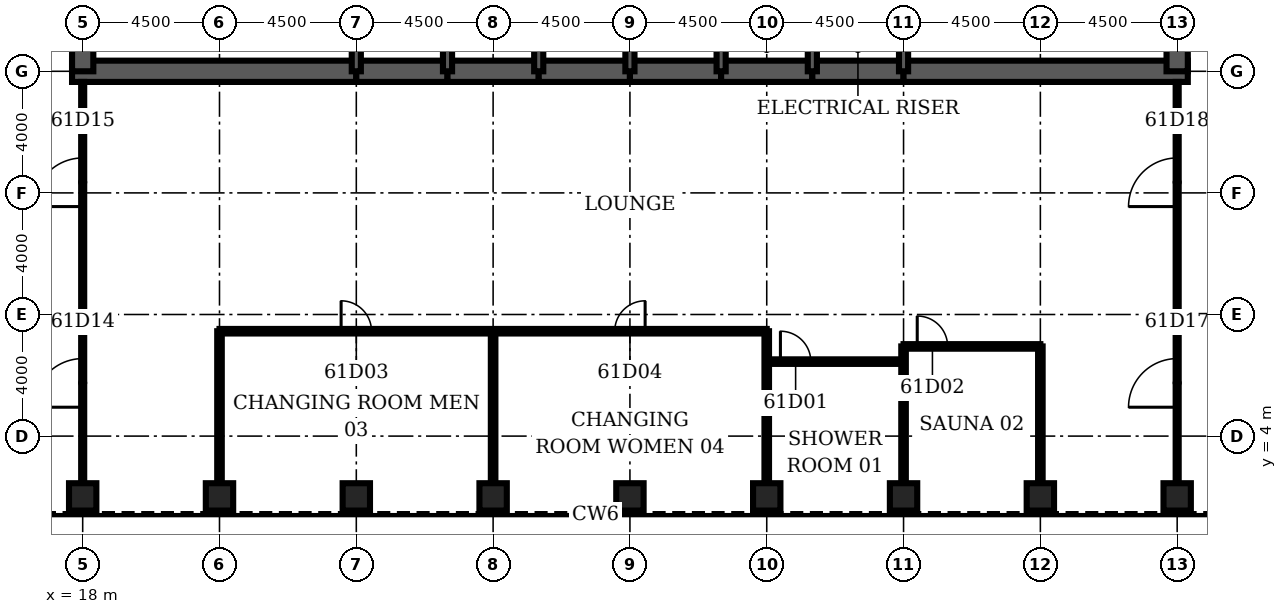
"""IFC4 building model, lengths in metres.
Left out: names, types, materials, properties, quantities, classifications, styles, units other than length and angle.
Written with IfcOpenShell. Run it as: python <this file> out.ifc"""

import sys

from ifc_helpers import new_model, si_unit, direction, frame, frame_2d, origin, origin_2d, place, context, subcontext, project, spatial, rectangle, hollow_rectangle, extrude, element, fill, save


model = new_model("IFC4")
c1 = context("Model", 3, precision=1e-05, world=origin(), true_north=direction((0.0, 1.0)))
c2 = subcontext(c1, "Body", "Model", "MODEL_VIEW")
j1 = project(units=[si_unit("LENGTHUNIT", "METRE"), si_unit("PLANEANGLEUNIT", "RADIAN")], contexts=[c1])
p1 = place(None, origin())
s1 = spatial("IfcSite", under=j1, at=p1, CompositionType="ELEMENT")
p2 = place(p1, origin())
s2 = spatial("IfcBuilding", under=s1, at=p2, CompositionType="ELEMENT")
p3 = place(p2, frame((0.0, 0.0, 271.1)))
s3 = spatial("IfcBuildingStorey", under=s2, at=p3, CompositionType="ELEMENT", Elevation=271.1)
for number, where, z_axis, x_axis in (
    (1, (18.0, 2.0, 0.0), (0.0, 0.0, 1.0), (0.0, 1.0, 0.0)),
    (2, (22.5, 2.0, 0.0), (0.0, 0.0, 1.0), (0.0, 1.0, 0.0)),
    (3, (27.0, 2.0, 0.0), (0.0, 0.0, 1.0), (0.0, 1.0, 0.0)),
    (4, (31.5, 2.0, 0.0), (0.0, 0.0, 1.0), (0.0, 1.0, 0.0)),
    (5, (36.0, 2.0, 0.0), (0.0, 0.0, 1.0), (0.0, 1.0, 0.0)),
    (6, (40.5, 2.0, 0.0), (0.0, 0.0, 1.0), (0.0, 1.0, 0.0)),
    (7, (45.0, 2.0, 0.0), (0.0, 0.0, 1.0), (0.0, 1.0, 0.0)),
    (8, (49.5, 2.0, 0.0), (0.0, 0.0, 1.0), (0.0, 1.0, 0.0)),
    (9, (54.0, 2.0, 0.0), (0.0, 0.0, 1.0), (0.0, 1.0, 0.0)),
):
    element("IfcColumn", number, at=place(p3, frame(where, z_axis=z_axis, x_axis=x_axis)), inside=s3, PredefinedType="COLUMN", context=c2, shape_type="SweptSolid", body=[
        extrude(hollow_rectangle(XDim=0.9, YDim=0.9, WallThickness=0.07, at=origin_2d()), origin(), (0.0, 0.0, 1.0), 4.2),
    ])
p4 = place(p3, frame((17.65, 16.0, 0.0), z_axis=(0.0, 0.0, 1.0), x_axis=(1.0, 0.0, 0.0)))
e10 = element("IfcWall", 10, at=p4, inside=s3, PredefinedType="SHEAR", context=c2, shape_type="SweptSolid", body=[
    extrude(rectangle(XDim=9.35, YDim=0.7, at=frame_2d((4.675, 0.0))), origin(), (0.0, 0.0, 1.0), 4.2),
])
for number, where, z_axis, x_axis in (
    (11, (27.0, 16.0, 0.0), (0.0, 0.0, 1.0), (1.0, 0.0, 0.0)),
    (12, (30.0, 16.0, 0.0), (0.0, 0.0, 1.0), (1.0, 0.0, 0.0)),
    (13, (33.0, 16.0, 0.0), (0.0, 0.0, 1.0), (1.0, 0.0, 0.0)),
    (14, (36.0, 16.0, 0.0), (0.0, 0.0, 1.0), (1.0, 0.0, 0.0)),
    (15, (39.0, 16.0, 0.0), (0.0, 0.0, 1.0), (1.0, 0.0, 0.0)),
    (16, (42.0, 16.0, 0.0), (0.0, 0.0, 1.0), (1.0, 0.0, 0.0)),
):
    element("IfcWall", number, at=place(p3, frame(where, z_axis=z_axis, x_axis=x_axis)), inside=s3, PredefinedType="SHEAR", context=c2, shape_type="SweptSolid", body=[
        extrude(rectangle(XDim=3.0, YDim=0.7, at=frame_2d((1.5, 0.0))), origin(), (0.0, 0.0, 1.0), 4.2),
    ])
p5 = place(p3, frame((45.0, 16.0, 0.0), z_axis=(0.0, 0.0, 1.0), x_axis=(1.0, 0.0, 0.0)))
e17 = element("IfcWall", 17, at=p5, inside=s3, PredefinedType="SHEAR", context=c2, shape_type="SweptSolid", body=[
    extrude(rectangle(XDim=9.35, YDim=0.7, at=frame_2d((4.675, 0.0))), origin(), (0.0, 0.0, 1.0), 4.2),
])
for number, where, z_axis, x_axis in (
    (18, (18.0, 19.2, 0.0), (0.0, 0.0, 1.0), (0.0, -1.0, 0.0)),
    (19, (54.0, 16.0, 0.0), (0.0, 0.0, 1.0), (0.0, 1.0, 0.0)),
):
    element("IfcWall", number, at=place(p3, frame(where, z_axis=z_axis, x_axis=x_axis)), inside=s3, PredefinedType="SHEAR", context=c2, shape_type="SweptSolid", body=[
        extrude(rectangle(XDim=3.2, YDim=0.7, at=frame_2d((1.6, 0.0))), origin(), (0.0, 0.0, 1.0), 4.2),
    ])
for number, where, z_axis, x_axis in (
    (20, (27.0, 16.0, 0.0), (0.0, 0.0, 1.0), (0.0, 1.0, 0.0)),
    (21, (30.0, 16.0, 0.0), (0.0, 0.0, 1.0), (0.0, 1.0, 0.0)),
    (22, (33.0, 16.0, 0.0), (0.0, 0.0, 1.0), (0.0, 1.0, 0.0)),
    (23, (36.0, 16.0, 0.0), (0.0, 0.0, 1.0), (0.0, 1.0, 0.0)),
    (24, (39.0, 16.0, 0.0), (0.0, 0.0, 1.0), (0.0, 1.0, 0.0)),
    (25, (42.0, 16.0, 0.0), (0.0, 0.0, 1.0), (0.0, 1.0, 0.0)),
    (26, (45.0, 16.0, 0.0), (0.0, 0.0, 1.0), (0.0, 1.0, 0.0)),
):
    element("IfcWall", number, at=place(p3, frame(where, z_axis=z_axis, x_axis=x_axis)), inside=s3, PredefinedType="SOLIDWALL", context=c2, shape_type="SweptSolid", body=[
        extrude(rectangle(XDim=3.2, YDim=0.3, at=frame_2d((1.6, 0.0))), origin(), (0.0, 0.0, 1.0), 4.2),
    ])
p6 = place(p3, frame((40.5, 6.45, 0.0), z_axis=(0.0, 0.0, 1.0), x_axis=(1.0, 0.0, 0.0)))
e27 = element("IfcWall", 27, at=p6, inside=s3, PredefinedType="PARTITIONING", context=c2, shape_type="SweptSolid", body=[
    extrude(rectangle(XDim=4.5, YDim=0.15, at=frame_2d((2.25, 0.0))), origin(), (0.0, 0.0, 1.0), 3.0),
])
p7 = place(p6, frame((0.45, 0.0, 0.0)))
e28 = element("IfcOpeningElement", 28, at=p7, cuts=e27, PredefinedType="OPENING", context=c2, shape_type="SweptSolid", body=[
    extrude(rectangle(XDim=1.0, YDim=2.1, at=frame_2d((0.5, 1.05))), frame((0.0, 0.085, 0.0), z_axis=(0.0, -1.0, 0.0), x_axis=(1.0, 0.0, 0.0)), (0.0, 0.0, 1.0), 0.17),
])
p8 = place(p3, frame((45.0, 6.95, 0.0), z_axis=(0.0, 0.0, 1.0), x_axis=(1.0, 0.0, 0.0)))
e29 = element("IfcWall", 29, at=p8, inside=s3, PredefinedType="PARTITIONING", context=c2, shape_type="SweptSolid", body=[
    extrude(rectangle(XDim=4.5, YDim=0.15, at=frame_2d((2.25, 0.0))), origin(), (0.0, 0.0, 1.0), 3.0),
])
p9 = place(p8, frame((0.45, 0.0, 0.0)))
e30 = element("IfcOpeningElement", 30, at=p9, cuts=e29, PredefinedType="OPENING", context=c2, shape_type="SweptSolid", body=[
    extrude(rectangle(XDim=1.0, YDim=2.1, at=frame_2d((0.5, 1.05))), frame((0.0, 0.085, 0.0), z_axis=(0.0, -1.0, 0.0), x_axis=(1.0, 0.0, 0.0)), (0.0, 0.0, 1.0), 0.17),
])
p10 = place(p3, frame((22.5, 7.45, 0.0), z_axis=(0.0, 0.0, 1.0), x_axis=(1.0, 0.0, 0.0)))
e31 = element("IfcWall", 31, at=p10, inside=s3, PredefinedType="PARTITIONING", context=c2, shape_type="SweptSolid", body=[
    extrude(rectangle(XDim=18.0, YDim=0.15, at=frame_2d((9.0, 0.0))), origin(), (0.0, 0.0, 1.0), 3.0),
])
p11 = place(p10, frame((4.0, 0.0, 0.0)))
e32 = element("IfcOpeningElement", 32, at=p11, cuts=e31, PredefinedType="OPENING", context=c2, shape_type="SweptSolid", body=[
    extrude(rectangle(XDim=1.0, YDim=2.1, at=frame_2d((0.5, 1.05))), frame((0.0, 0.085, 0.0), z_axis=(0.0, -1.0, 0.0), x_axis=(1.0, 0.0, 0.0)), (0.0, 0.0, 1.0), 0.17),
])
p12 = place(p10, frame((13.0, 0.0, 0.0)))
e33 = element("IfcOpeningElement", 33, at=p12, cuts=e31, PredefinedType="OPENING", context=c2, shape_type="SweptSolid", body=[
    extrude(rectangle(XDim=1.0, YDim=2.1, at=frame_2d((0.5, 1.05))), frame((0.0, 0.085, 0.0), z_axis=(0.0, -1.0, 0.0), x_axis=(1.0, 0.0, 0.0)), (0.0, 0.0, 1.0), 0.17),
])
p13 = place(p3, frame((18.0, 2.45, 0.0), z_axis=(0.0, 0.0, 1.0), x_axis=(0.0, 1.0, 0.0)))
e34 = element("IfcWall", 34, at=p13, inside=s3, PredefinedType="PARTITIONING", context=c2, shape_type="SweptSolid", body=[
    extrude(rectangle(XDim=13.2, YDim=0.1, at=frame_2d((6.6, 0.0))), origin(), (0.0, 0.0, 1.0), 3.0),
])
p14 = place(p13, frame((2.5, 0.0, 0.0)))
e35 = element("IfcOpeningElement", 35, at=p14, cuts=e34, PredefinedType="OPENING", context=c2, shape_type="SweptSolid", body=[
    extrude(rectangle(XDim=1.6, YDim=2.1, at=frame_2d((0.8, 1.05))), frame((0.0, 0.06, 0.0), z_axis=(0.0, -1.0, 0.0), x_axis=(1.0, 0.0, 0.0)), (0.0, 0.0, 1.0), 0.12),
])
p15 = place(p13, frame((9.1, 0.0, 0.0)))
e36 = element("IfcOpeningElement", 36, at=p15, cuts=e34, PredefinedType="OPENING", context=c2, shape_type="SweptSolid", body=[
    extrude(rectangle(XDim=1.6, YDim=2.1, at=frame_2d((0.8, 1.05))), frame((0.0, 0.06, 0.0), z_axis=(0.0, -1.0, 0.0), x_axis=(1.0, 0.0, 0.0)), (0.0, 0.0, 1.0), 0.12),
])
for number, where, z_axis, x_axis in (
    (37, (22.5, 2.45, 0.0), (0.0, 0.0, 1.0), (0.0, 1.0, 0.0)),
    (38, (31.5, 2.45, 0.0), (0.0, 0.0, 1.0), (0.0, 1.0, 0.0)),
    (39, (40.5, 2.45, 0.0), (0.0, 0.0, 1.0), (0.0, 1.0, 0.0)),
):
    element("IfcWall", number, at=place(p3, frame(where, z_axis=z_axis, x_axis=x_axis)), inside=s3, PredefinedType="PARTITIONING", context=c2, shape_type="SweptSolid", body=[
        extrude(rectangle(XDim=5.0, YDim=0.15, at=frame_2d((2.5, 0.0))), origin(), (0.0, 0.0, 1.0), 3.0),
    ])
for number, where, z_axis, x_axis in (
    (40, (45.0, 2.45, 0.0), (0.0, 0.0, 1.0), (0.0, 1.0, 0.0)),
    (41, (49.5, 2.45, 0.0), (0.0, 0.0, 1.0), (0.0, 1.0, 0.0)),
):
    element("IfcWall", number, at=place(p3, frame(where, z_axis=z_axis, x_axis=x_axis)), inside=s3, PredefinedType="PARTITIONING", context=c2, shape_type="SweptSolid", body=[
        extrude(rectangle(XDim=4.5, YDim=0.15, at=frame_2d((2.25, 0.0))), origin(), (0.0, 0.0, 1.0), 3.0),
    ])
p16 = place(p3, frame((54.0, 2.45, 0.0), z_axis=(0.0, 0.0, 1.0), x_axis=(0.0, 1.0, 0.0)))
e42 = element("IfcWall", 42, at=p16, inside=s3, PredefinedType="PARTITIONING", context=c2, shape_type="SweptSolid", body=[
    extrude(rectangle(XDim=13.2, YDim=0.1, at=frame_2d((6.6, 0.0))), origin(), (0.0, 0.0, 1.0), 3.0),
])
p17 = place(p16, frame((2.5, 0.0, 0.0)))
e43 = element("IfcOpeningElement", 43, at=p17, cuts=e42, PredefinedType="OPENING", context=c2, shape_type="SweptSolid", body=[
    extrude(rectangle(XDim=1.6, YDim=2.1, at=frame_2d((0.8, 1.05))), frame((0.0, 0.06, 0.0), z_axis=(0.0, -1.0, 0.0), x_axis=(1.0, 0.0, 0.0)), (0.0, 0.0, 1.0), 0.12),
])
p18 = place(p16, frame((9.1, 0.0, 0.0)))
e44 = element("IfcOpeningElement", 44, at=p18, cuts=e42, PredefinedType="OPENING", context=c2, shape_type="SweptSolid", body=[
    extrude(rectangle(XDim=1.6, YDim=2.1, at=frame_2d((0.8, 1.05))), frame((0.0, 0.06, 0.0), z_axis=(0.0, -1.0, 0.0), x_axis=(1.0, 0.0, 0.0)), (0.0, 0.0, 1.0), 0.12),
])
p19 = place(p7, origin())
e45 = element("IfcDoor", 45, at=p19, inside=s3, OperationType="SINGLE_SWING_LEFT", PredefinedType="DOOR", context=c2, shape_type="SweptSolid", body=[
    extrude(rectangle(XDim=1.0, YDim=2.1, at=frame_2d((0.5, 1.05))), frame((0.0, 0.025, 0.0), z_axis=(0.0, -1.0, 0.0), x_axis=(1.0, 0.0, 0.0)), (0.0, 0.0, 1.0), 0.05),
])
fill(e28, e45)
p20 = place(p9, origin())
e46 = element("IfcDoor", 46, at=p20, inside=s3, OperationType="SINGLE_SWING_LEFT", PredefinedType="DOOR", context=c2, shape_type="SweptSolid", body=[
    extrude(rectangle(XDim=1.0, YDim=2.1, at=frame_2d((0.5, 1.05))), frame((0.0, 0.025, 0.0), z_axis=(0.0, -1.0, 0.0), x_axis=(1.0, 0.0, 0.0)), (0.0, 0.0, 1.0), 0.05),
])
fill(e30, e46)
p21 = place(p11, origin())
e47 = element("IfcDoor", 47, at=p21, inside=s3, OperationType="SINGLE_SWING_LEFT", PredefinedType="DOOR", context=c2, shape_type="SweptSolid", body=[
    extrude(rectangle(XDim=1.0, YDim=2.1, at=frame_2d((0.5, 1.05))), frame((0.0, 0.025, 0.0), z_axis=(0.0, -1.0, 0.0), x_axis=(1.0, 0.0, 0.0)), (0.0, 0.0, 1.0), 0.05),
])
fill(e32, e47)
p22 = place(p12, origin())
e48 = element("IfcDoor", 48, at=p22, inside=s3, OperationType="SINGLE_SWING_RIGHT", PredefinedType="DOOR", context=c2, shape_type="SweptSolid", body=[
    extrude(rectangle(XDim=1.0, YDim=2.1, at=frame_2d((0.5, 1.05))), frame((0.0, 0.025, 0.0), z_axis=(0.0, -1.0, 0.0), x_axis=(1.0, 0.0, 0.0)), (0.0, 0.0, 1.0), 0.05),
])
fill(e33, e48)
p23 = place(p14, origin())
e49 = element("IfcDoor", 49, at=p23, inside=s3, OperationType="SINGLE_SWING_LEFT", PredefinedType="DOOR", context=c2, shape_type="SweptSolid", body=[
    extrude(rectangle(XDim=1.6, YDim=2.1, at=frame_2d((0.8, 1.05))), frame((0.0, 0.025, 0.0), z_axis=(0.0, -1.0, 0.0), x_axis=(1.0, 0.0, 0.0)), (0.0, 0.0, 1.0), 0.05),
])
fill(e35, e49)
p24 = place(p15, origin())
e50 = element("IfcDoor", 50, at=p24, inside=s3, OperationType="SINGLE_SWING_LEFT", PredefinedType="DOOR", context=c2, shape_type="SweptSolid", body=[
    extrude(rectangle(XDim=1.6, YDim=2.1, at=frame_2d((0.8, 1.05))), frame((0.0, 0.025, 0.0), z_axis=(0.0, -1.0, 0.0), x_axis=(1.0, 0.0, 0.0)), (0.0, 0.0, 1.0), 0.05),
])
fill(e36, e50)
p25 = place(p17, origin())
e51 = element("IfcDoor", 51, at=p25, inside=s3, OperationType="SINGLE_SWING_LEFT", PredefinedType="DOOR", context=c2, shape_type="SweptSolid", body=[
    extrude(rectangle(XDim=1.6, YDim=2.1, at=frame_2d((0.8, 1.05))), frame((0.0, 0.025, 0.0), z_axis=(0.0, -1.0, 0.0), x_axis=(1.0, 0.0, 0.0)), (0.0, 0.0, 1.0), 0.05),
])
fill(e43, e51)
p26 = place(p18, origin())
e52 = element("IfcDoor", 52, at=p26, inside=s3, OperationType="SINGLE_SWING_LEFT", PredefinedType="DOOR", context=c2, shape_type="SweptSolid", body=[
    extrude(rectangle(XDim=1.6, YDim=2.1, at=frame_2d((0.8, 1.05))), frame((0.0, 0.025, 0.0), z_axis=(0.0, -1.0, 0.0), x_axis=(1.0, 0.0, 0.0)), (0.0, 0.0, 1.0), 0.05),
])
fill(e44, e52)
save(model, sys.argv[1])
